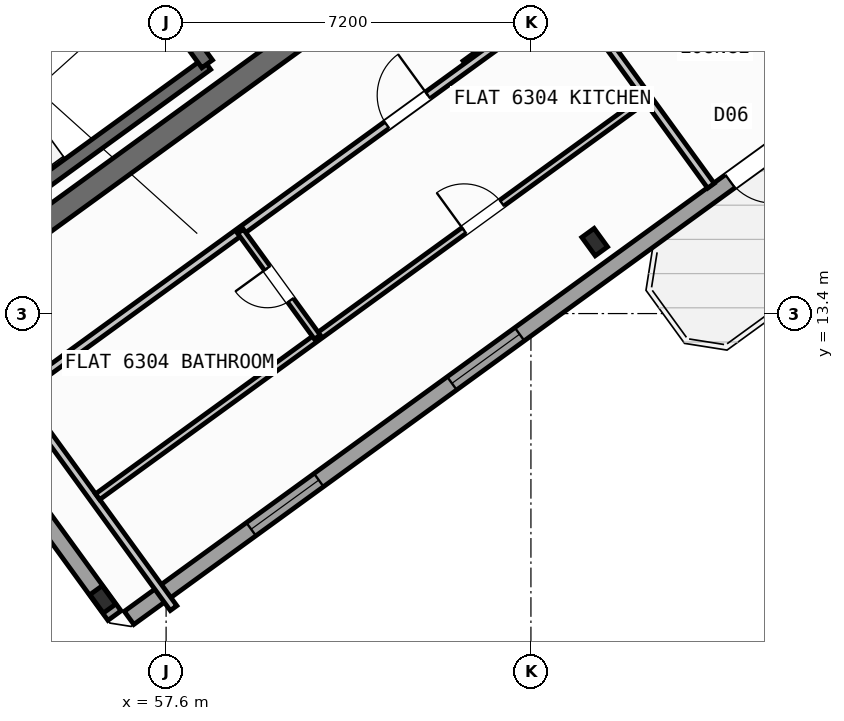
"""IFC4 building model, lengths in metres.
Left out: names, types, materials, properties, quantities, classifications, styles, units other than length and angle.
Written with IfcOpenShell. Run it as: python <this file> out.ifc"""

import sys

from ifc_helpers import new_model, si_unit, direction, frame, frame_2d, origin, origin_2d, place, context, subcontext, project, spatial, rectangle, i_section, extrude, source, transform, mapped, element, fill, save


model = new_model("IFC4")
c1 = context("Model", 3, precision=1e-05, world=origin(), true_north=direction((0.0, 1.0)))
c2 = subcontext(c1, "Body", "Model", "MODEL_VIEW")
j1 = project(units=[si_unit("LENGTHUNIT", "METRE"), si_unit("PLANEANGLEUNIT", "RADIAN")], contexts=[c1])
p1 = place(None, origin())
s1 = spatial("IfcSite", under=j1, at=p1, CompositionType="ELEMENT")
p2 = place(p1, origin())
s2 = spatial("IfcBuilding", under=s1, at=p2, CompositionType="ELEMENT")
p3 = place(p2, frame((0.0, 0.0, 251.1)))
s3 = spatial("IfcBuildingStorey", under=s2, at=p3, CompositionType="ELEMENT", Elevation=251.1)
p4 = place(p3, frame((52.399, 13.169, 0.0), z_axis=(0.0, 0.0, 1.0), x_axis=(0.809022352778, 0.587777877013, 0.0)))
e1 = element("IfcWall", 1, at=p4, inside=s3, PredefinedType="SHEAR", context=c2, shape_type="SweptSolid", body=[
    extrude(rectangle(XDim=12.24, YDim=0.45, at=frame_2d((6.12, 0.0))), origin(), (0.0, 0.0, 1.0), 3.32),
])
m1 = source(origin(), c2, "Body", "SweptSolid", [
    extrude(i_section(OverallWidth=0.3, OverallDepth=0.45, WebThickness=0.014, FlangeThickness=0.026, at=origin_2d()), origin(), (0.0, 0.0, 1.0), 3.6),
])
for number, where, z_axis, x_axis in (
    (2, (56.35, 7.758, 0.0), (0.0, 0.0, 1.0), (0.809, 0.588, 0.0)),
    (3, (66.058, 14.811, 0.0), (0.0, 0.0, 1.0), (0.809, 0.588, 0.0)),
):
    element("IfcColumn", number, at=place(p3, frame(where, z_axis=z_axis, x_axis=x_axis)), inside=s3, PredefinedType="COLUMN", context=c2, shape_type="MappedRepresentation", body=[
        mapped(m1, transform((0.0, 0.0, 0.0), scale=1.0)),
    ])
p5 = place(p3, frame((58.455, 35.484, 0.0), z_axis=(0.0, 0.0, 1.0), x_axis=(0.587783625747, -0.809018176127, 0.0)))
e4 = element("IfcWall", 4, at=p5, inside=s3, PredefinedType="STANDARD", context=c2, shape_type="SweptSolid", body=[
    extrude(rectangle(XDim=21.587, YDim=0.32, at=frame_2d((10.794, 0.0))), origin(), (0.0, 0.0, 1.0), 2.845),
])
p6 = place(p5, frame((1.65, 0.0, 0.9)))
e5 = element("IfcOpeningElement", 5, at=p6, cuts=e4, PredefinedType="OPENING", context=c2, shape_type="SweptSolid", body=[
    extrude(rectangle(XDim=1.65, YDim=1.45, at=frame_2d((0.825, 0.725))), frame((0.0, 0.17, 0.0), z_axis=(0.0, -1.0, 0.0), x_axis=(1.0, 0.0, 0.0)), (0.0, 0.0, 1.0), 0.34),
])
p7 = place(p5, frame((5.255, 0.0, 0.9)))
e6 = element("IfcOpeningElement", 6, at=p7, cuts=e4, PredefinedType="OPENING", context=c2, shape_type="SweptSolid", body=[
    extrude(rectangle(XDim=1.35, YDim=1.45, at=frame_2d((0.675, 0.725))), frame((0.0, 0.17, 0.0), z_axis=(0.0, -1.0, 0.0), x_axis=(1.0, 0.0, 0.0)), (0.0, 0.0, 1.0), 0.34),
])
p8 = place(p5, frame((8.654, 0.0, 0.95)))
e7 = element("IfcOpeningElement", 7, at=p8, cuts=e4, PredefinedType="OPENING", context=c2, shape_type="SweptSolid", body=[
    extrude(rectangle(XDim=1.95, YDim=1.35, at=frame_2d((0.975, 0.675))), frame((0.0, 0.17, 0.0), z_axis=(0.0, -1.0, 0.0), x_axis=(1.0, 0.0, 0.0)), (0.0, 0.0, 1.0), 0.34),
])
p9 = place(p3, frame((71.098, 17.731, 0.0), z_axis=(0.0, 0.0, 1.0), x_axis=(-0.809021120468, -0.587779573171, 0.0)))
e8 = element("IfcWall", 8, at=p9, inside=s3, PredefinedType="STANDARD", context=c2, shape_type="SweptSolid", body=[
    extrude(rectangle(XDim=17.588, YDim=0.32, at=frame_2d((8.794, 0.0))), origin(), (0.0, 0.0, 1.0), 3.32),
])
p10 = place(p9, frame((1.875, 0.0, 0.0)))
e9 = element("IfcOpeningElement", 9, at=p10, cuts=e8, PredefinedType="OPENING", context=c2, shape_type="SweptSolid", body=[
    extrude(rectangle(XDim=1.05, YDim=2.15, at=frame_2d((0.525, 1.075))), frame((0.0, 0.17, 0.0), z_axis=(0.0, -1.0, 0.0), x_axis=(1.0, 0.0, 0.0)), (0.0, 0.0, 1.0), 0.34),
])
p11 = place(p9, frame((8.061, 0.0, 0.9)))
e10 = element("IfcOpeningElement", 10, at=p11, cuts=e8, PredefinedType="OPENING", context=c2, shape_type="SweptSolid", body=[
    extrude(rectangle(XDim=1.65, YDim=1.45, at=frame_2d((0.825, 0.725))), frame((0.0, 0.17, 0.0), z_axis=(0.0, -1.0, 0.0), x_axis=(1.0, 0.0, 0.0)), (0.0, 0.0, 1.0), 0.34),
])
p12 = place(p9, frame((12.96, 0.0, 0.9)))
e11 = element("IfcOpeningElement", 11, at=p12, cuts=e8, PredefinedType="OPENING", context=c2, shape_type="SweptSolid", body=[
    extrude(rectangle(XDim=1.65, YDim=1.45, at=frame_2d((0.825, 0.725))), frame((0.0, 0.17, 0.0), z_axis=(0.0, -1.0, 0.0), x_axis=(1.0, 0.0, 0.0)), (0.0, 0.0, 1.0), 0.34),
])
p13 = place(p3, frame((56.581, 7.439, 0.0), z_axis=(0.0, 0.0, 1.0), x_axis=(-0.587776558368, 0.809023310809, 0.0)))
e12 = element("IfcWall", 12, at=p13, inside=s3, PredefinedType="STANDARD", context=c2, shape_type="SweptSolid", body=[
    extrude(rectangle(XDim=7.385, YDim=0.32, at=frame_2d((3.693, 0.0))), origin(), (0.0, 0.0, 1.0), 2.845),
])
p14 = place(p3, frame((52.472, 14.013, 0.0), z_axis=(0.0, 0.0, 1.0), x_axis=(0.809028366311, 0.587769599847, 0.0)))
e13 = element("IfcWall", 13, at=p14, inside=s3, PredefinedType="SHEAR", context=c2, shape_type="SweptSolid", body=[
    extrude(rectangle(XDim=7.33, YDim=0.26, at=frame_2d((3.665, 0.0))), origin(), (0.0, 0.0, 1.0), 3.32),
])
p15 = place(p3, frame((50.615, 16.57, 0.0), z_axis=(0.0, 0.0, 1.0), x_axis=(0.809028366311, 0.587769599847, 0.0)))
e14 = element("IfcWall", 14, at=p15, inside=s3, PredefinedType="SHEAR", context=c2, shape_type="SweptSolid", body=[
    extrude(rectangle(XDim=7.33, YDim=0.26, at=frame_2d((3.665, 0.0))), origin(), (0.0, 0.0, 1.0), 3.32),
])
p16 = place(p15, frame((0.22, 0.0, 0.0)))
e15 = element("IfcOpeningElement", 15, at=p16, cuts=e14, PredefinedType="OPENING", context=c2, shape_type="SweptSolid", body=[
    extrude(rectangle(XDim=1.1, YDim=2.1, at=frame_2d((0.55, 1.05))), frame((0.0, 0.14, 0.0), z_axis=(0.0, -1.0, 0.0), x_axis=(1.0, 0.0, 0.0)), (0.0, 0.0, 1.0), 0.28),
])
p17 = place(p3, frame((58.41, 18.327, 0.0), z_axis=(0.0, 0.0, 1.0), x_axis=(-0.58776738483, 0.809029975545, 0.0)))
e16 = element("IfcWall", 16, at=p17, inside=s3, PredefinedType="SHEAR", context=c2, shape_type="SweptSolid", body=[
    extrude(rectangle(XDim=3.16, YDim=0.26, at=frame_2d((1.58, 0.0))), origin(), (0.0, 0.0, 1.0), 3.32),
])
p18 = place(p3, frame((63.507, 18.322, 0.0), z_axis=(0.0, 0.0, 1.0), x_axis=(0.809034604122, 0.587761013791, 0.0)))
e17 = element("IfcWall", 17, at=p18, inside=s3, PredefinedType="PARTITIONING", context=c2, shape_type="SweptSolid", body=[
    extrude(rectangle(XDim=2.51, YDim=0.16, at=frame_2d((1.255, 0.0))), origin(), (0.0, 0.0, 1.0), 3.31),
])
p19 = place(p3, frame((68.353, 15.922, 0.0), z_axis=(0.0, 0.0, 1.0), x_axis=(-0.58776839458, 0.809029241952, 0.0)))
e18 = element("IfcWall", 18, at=p19, inside=s3, PredefinedType="PARTITIONING", context=c2, shape_type="SweptSolid", body=[
    extrude(rectangle(XDim=8.1, YDim=0.16, at=frame_2d((4.05, 0.0))), origin(), (0.0, 0.0, 1.0), 3.31),
])
p20 = place(p3, frame((53.705, 11.126, 0.0), z_axis=(0.0, 0.0, 1.0), x_axis=(0.809014504436, 0.587788679384, 0.0)))
e19 = element("IfcWall", 19, at=p20, inside=s3, PredefinedType="PARTITIONING", context=c2, shape_type="SweptSolid", body=[
    extrude(rectangle(XDim=14.67, YDim=0.16, at=frame_2d((7.335, 0.0))), origin(), (0.0, 0.0, 1.0), 3.31),
])
p21 = place(p20, frame((10.2, 0.0, 0.0)))
e20 = element("IfcOpeningElement", 20, at=p21, cuts=e19, PredefinedType="OPENING", context=c2, shape_type="SweptSolid", body=[
    extrude(rectangle(XDim=1.0, YDim=2.1, at=frame_2d((0.5, 1.05))), frame((0.0, 0.09, 0.0), z_axis=(0.0, -1.0, 0.0), x_axis=(1.0, 0.0, 0.0)), (0.0, 0.0, 1.0), 0.18),
])
p22 = place(p3, frame((57.747, 7.586, 0.0), z_axis=(0.0, 0.0, 1.0), x_axis=(-0.587784893399, 0.809017255126, 0.0)))
e21 = element("IfcWall", 21, at=p22, inside=s3, PredefinedType="PARTITIONING", context=c2, shape_type="SweptSolid", body=[
    extrude(rectangle(XDim=5.48, YDim=0.16, at=frame_2d((2.74, 0.0))), origin(), (0.0, 0.0, 1.0), 3.31),
])
p23 = place(p3, frame((56.249, 9.785, 0.0), z_axis=(0.0, 0.0, 1.0), x_axis=(0.809011747655, 0.587792473715, 0.0)))
e22 = element("IfcWall", 22, at=p23, inside=s3, PredefinedType="PLUMBINGWALL", context=c2, shape_type="SweptSolid", body=[
    extrude(rectangle(XDim=13.4, YDim=0.14, at=frame_2d((6.7, 0.0))), origin(), (0.0, 0.0, 1.0), 3.31),
])
p24 = place(p23, frame((8.94, 0.0, 0.0)))
e23 = element("IfcOpeningElement", 23, at=p24, cuts=e22, PredefinedType="OPENING", context=c2, shape_type="SweptSolid", body=[
    extrude(rectangle(XDim=0.92, YDim=2.08, at=frame_2d((0.46, 1.04))), frame((0.0, 0.08, 0.0), z_axis=(0.0, -1.0, 0.0), x_axis=(1.0, 0.0, 0.0)), (0.0, 0.0, 1.0), 0.16),
])
p25 = place(p3, frame((60.585, 12.936, 0.0), z_axis=(0.0, 0.0, 1.0), x_axis=(-0.587772116736, 0.809026537752, 0.0)))
e24 = element("IfcWall", 24, at=p25, inside=s3, PredefinedType="PLUMBINGWALL", context=c2, shape_type="SweptSolid", body=[
    extrude(rectangle(XDim=2.58, YDim=0.14, at=frame_2d((1.29, 0.0))), origin(), (0.0, 0.0, 1.0), 3.31),
])
p26 = place(p25, frame((0.9, 0.0, 0.0)))
e25 = element("IfcOpeningElement", 25, at=p26, cuts=e24, PredefinedType="OPENING", context=c2, shape_type="SweptSolid", body=[
    extrude(rectangle(XDim=0.78, YDim=2.05, at=frame_2d((0.39, 1.025))), frame((0.0, 0.08, 0.0), z_axis=(0.0, -1.0, 0.0), x_axis=(1.0, 0.0, 0.0)), (0.0, 0.0, 1.0), 0.16),
])
m2 = source(origin(), c2, "Body", "SweptSolid", [
    extrude(rectangle(XDim=1.05, YDim=2.15, at=frame_2d((0.525, 1.075))), frame((0.0, 0.025, 0.0), z_axis=(0.0, -1.0, 0.0), x_axis=(1.0, 0.0, 0.0)), (0.0, 0.0, 1.0), 0.05),
])
p27 = place(p10, origin())
e26 = element("IfcDoor", 26, at=p27, inside=s3, OperationType="SINGLE_SWING_LEFT", PredefinedType="DOOR", context=c2, shape_type="MappedRepresentation", body=[
    mapped(m2, transform((0.0, 0.0, 0.0), scale=1.0)),
])
fill(e9, e26)
m3 = source(origin(), c2, "Body", "SweptSolid", [
    extrude(rectangle(XDim=1.65, YDim=1.45, at=frame_2d((0.825, 0.725))), frame((0.0, 0.03, 0.0), z_axis=(0.0, -1.0, 0.0), x_axis=(1.0, 0.0, 0.0)), (0.0, 0.0, 1.0), 0.06),
])
p28 = place(p11, origin())
e27 = element("IfcWindow", 27, at=p28, inside=s3, PartitioningType="SINGLE_PANEL", PredefinedType="WINDOW", context=c2, shape_type="MappedRepresentation", body=[
    mapped(m3, transform((0.0, 0.0, 0.0), scale=1.0)),
])
fill(e10, e27)
p29 = place(p12, origin())
e28 = element("IfcWindow", 28, at=p29, inside=s3, PartitioningType="SINGLE_PANEL", PredefinedType="WINDOW", context=c2, shape_type="MappedRepresentation", body=[
    mapped(m3, transform((0.0, 0.0, 0.0), scale=1.0)),
])
fill(e11, e28)
m4 = source(origin(), c2, "Body", "SweptSolid", [
    extrude(rectangle(XDim=1.0, YDim=2.1, at=frame_2d((0.5, 1.05))), frame((0.0, 0.025, 0.0), z_axis=(0.0, -1.0, 0.0), x_axis=(1.0, 0.0, 0.0)), (0.0, 0.0, 1.0), 0.05),
])
p30 = place(p21, origin())
e29 = element("IfcDoor", 29, at=p30, inside=s3, OperationType="SINGLE_SWING_RIGHT", PredefinedType="DOOR", context=c2, shape_type="MappedRepresentation", body=[
    mapped(m4, transform((0.0, 0.0, 0.0), scale=1.0)),
])
fill(e20, e29)
m5 = source(origin(), c2, "Body", "SweptSolid", [
    extrude(rectangle(XDim=0.92, YDim=2.08, at=frame_2d((0.46, 1.04))), frame((0.0, 0.025, 0.0), z_axis=(0.0, -1.0, 0.0), x_axis=(1.0, 0.0, 0.0)), (0.0, 0.0, 1.0), 0.05),
])
p31 = place(p24, origin())
e30 = element("IfcDoor", 30, at=p31, inside=s3, OperationType="SINGLE_SWING_LEFT", PredefinedType="DOOR", context=c2, shape_type="MappedRepresentation", body=[
    mapped(m5, transform((0.0, 0.0, 0.0), scale=1.0)),
])
fill(e23, e30)
m6 = source(origin(), c2, "Body", "SweptSolid", [
    extrude(rectangle(XDim=0.78, YDim=2.05, at=frame_2d((0.39, 1.025))), frame((0.0, 0.025, 0.0), z_axis=(0.0, -1.0, 0.0), x_axis=(1.0, 0.0, 0.0)), (0.0, 0.0, 1.0), 0.05),
])
p32 = place(p26, origin())
e31 = element("IfcDoor", 31, at=p32, inside=s3, OperationType="SINGLE_SWING_RIGHT", PredefinedType="DOOR", context=c2, shape_type="MappedRepresentation", body=[
    mapped(m6, transform((0.0, 0.0, 0.0), scale=1.0)),
])
fill(e25, e31)
save(model, sys.argv[1])
